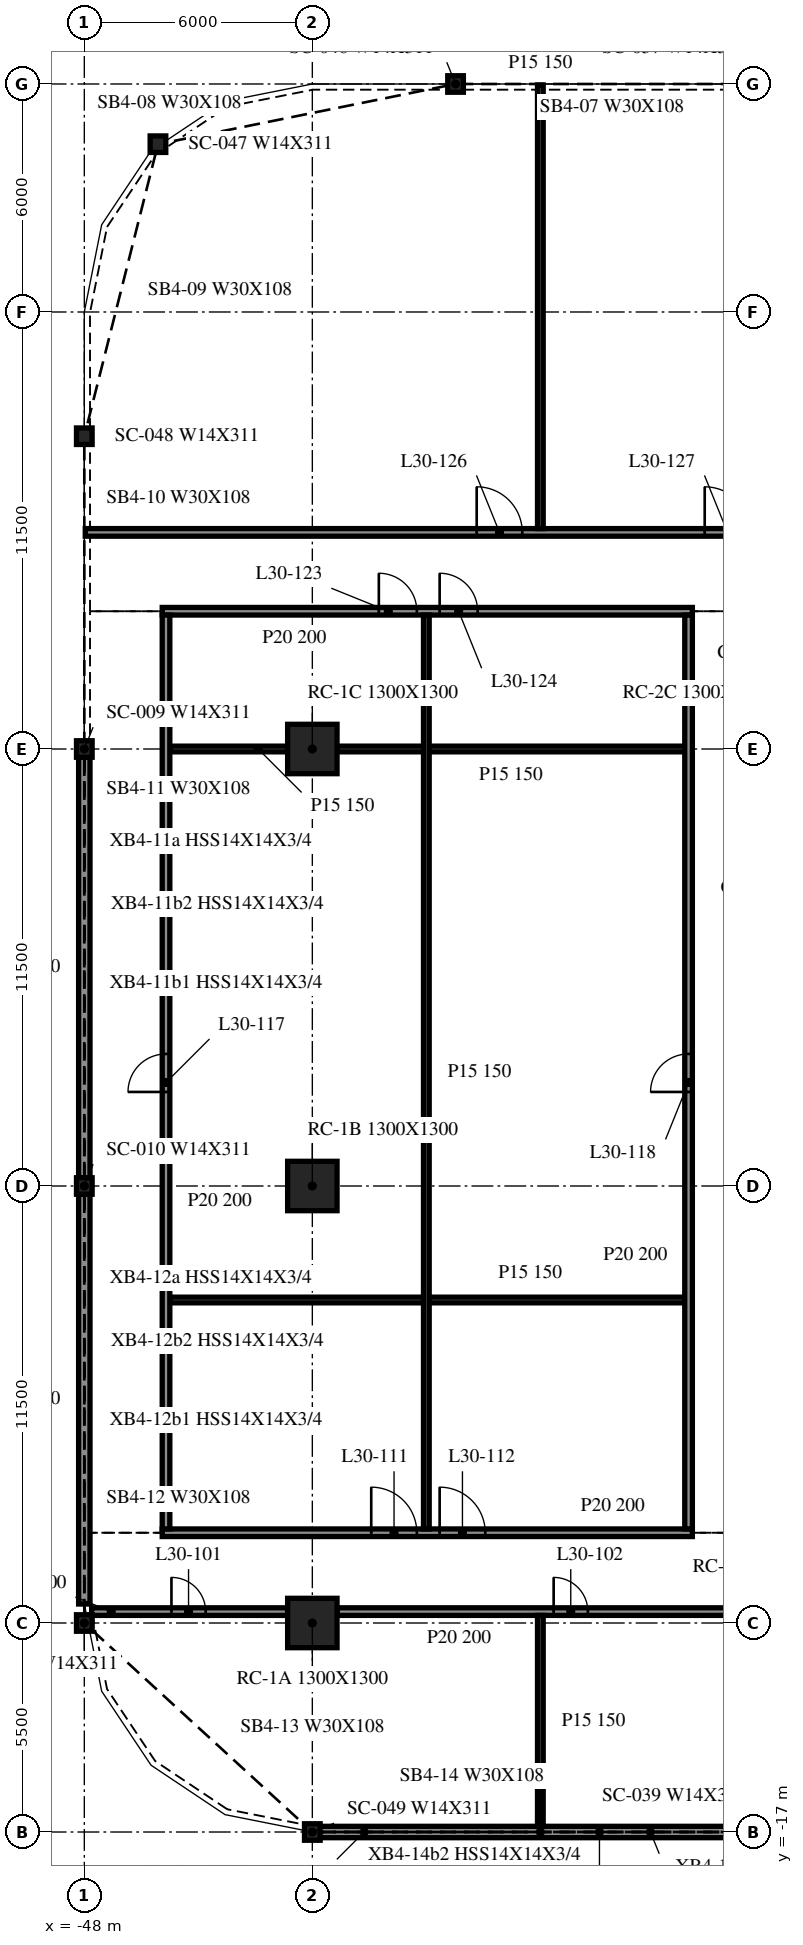
"""IFC4 building model, lengths in metres.
Left out: names, types, materials, properties, quantities, classifications, styles, units other than length and angle.
Written with IfcOpenShell. Run it as: python <this file> out.ifc"""

import sys

from ifc_helpers import new_model, si_unit, direction, frame, frame_2d, origin, origin_2d, place, context, subcontext, project, spatial, rectangle, i_section, extrude, element, fill, save


model = new_model("IFC4")
c1 = context("Model", 3, precision=1e-05, world=origin(), true_north=direction((0.0, 1.0)))
c2 = subcontext(c1, "Body", "Model", "MODEL_VIEW")
j1 = project(units=[si_unit("LENGTHUNIT", "METRE"), si_unit("PLANEANGLEUNIT", "RADIAN")], contexts=[c1])
p1 = place(None, origin())
s1 = spatial("IfcSite", under=j1, at=p1, CompositionType="ELEMENT")
p2 = place(p1, origin())
s2 = spatial("IfcBuilding", under=s1, at=p2, CompositionType="ELEMENT")
p3 = place(p2, frame((0.0, 0.0, 130.2)))
s3 = spatial("IfcBuildingStorey", under=s2, at=p3, CompositionType="ELEMENT", Elevation=130.2)
for number, where, z_axis, x_axis in (
    (1, (-42.0, -11.5, -0.34), (0.0, 0.0, 1.0), (1.0, 0.0, 0.0)),
    (2, (-42.0, 0.0, -0.34), (0.0, 0.0, 1.0), (1.0, 0.0, 0.0)),
    (3, (-42.0, 11.5, -0.34), (0.0, 0.0, 1.0), (1.0, 0.0, 0.0)),
):
    element("IfcColumn", number, at=place(p3, frame(where, z_axis=z_axis, x_axis=x_axis)), inside=s3, PredefinedType="COLUMN", context=c2, shape_type="SweptSolid", body=[
        extrude(rectangle(XDim=1.3, YDim=1.3, at=origin_2d()), origin(), (0.0, 0.0, 1.0), 4.1),
    ])
for number, where, z_axis, x_axis in (
    (4, (-38.231, 29.0, -0.34), (0.0, 0.0, 1.0), (1.0, 0.0, 0.0)),
    (5, (-46.062, 27.416, -0.34), (0.0, 0.0, 1.0), (1.0, 0.0, 0.0)),
    (6, (-48.0, 19.731, -0.34), (0.0, 0.0, 1.0), (1.0, 0.0, 0.0)),
    (7, (-48.0, 11.5, -0.34), (0.0, 0.0, 1.0), (1.0, 0.0, 0.0)),
    (8, (-48.0, 0.0, -0.34), (0.0, 0.0, 1.0), (1.0, 0.0, 0.0)),
    (9, (-48.0, -11.5, -0.34), (0.0, 0.0, 1.0), (1.0, 0.0, 0.0)),
    (10, (-42.0, -17.0, -0.34), (0.0, 0.0, 1.0), (1.0, 0.0, 0.0)),
):
    element("IfcColumn", number, at=place(p3, frame(where, z_axis=z_axis, x_axis=x_axis)), inside=s3, PredefinedType="COLUMN", context=c2, shape_type="SweptSolid", body=[
        extrude(i_section(OverallWidth=0.412, OverallDepth=0.434, WebThickness=0.036, FlangeThickness=0.057, at=origin_2d()), origin(), (0.0, 0.0, 1.0), 4.1),
    ])
p4 = place(p3, frame((-48.0, 11.282, 0.0), z_axis=(0.0, 0.0, 1.0), x_axis=(0.0, -1.0, 0.0)))
e11 = element("IfcWall", 11, at=p4, inside=s3, PredefinedType="NOTDEFINED", context=c2, shape_type="SweptSolid", body=[
    extrude(rectangle(XDim=11.064, YDim=0.3, at=frame_2d((5.532, 0.0))), origin(), (0.0, 0.0, 1.0), 3.003),
])
p5 = place(p3, frame((-48.0, -0.218, 0.0), z_axis=(0.0, 0.0, 1.0), x_axis=(0.0, -1.0, 0.0)))
e12 = element("IfcWall", 12, at=p5, inside=s3, PredefinedType="NOTDEFINED", context=c2, shape_type="SweptSolid", body=[
    extrude(rectangle(XDim=10.782, YDim=0.3, at=frame_2d((5.391, 0.0))), origin(), (0.0, 0.0, 1.0), 3.003),
])
p6 = place(p3, frame((-41.982, -17.0, 0.0), z_axis=(0.0, 0.0, 1.0), x_axis=(1.0, 0.0, 0.0)))
e13 = element("IfcWall", 13, at=p6, inside=s3, PredefinedType="NOTDEFINED", context=c2, shape_type="SweptSolid", body=[
    extrude(rectangle(XDim=11.964, YDim=0.3, at=frame_2d((5.982, 0.0))), origin(), (0.0, 0.0, 1.0), 3.003),
])
p7 = place(p3, frame((-47.807, -11.2, 0.0), z_axis=(0.0, 0.0, 1.0), x_axis=(1.0, 0.0, 0.0)))
e14 = element("IfcWall", 14, at=p7, inside=s3, PredefinedType="PARTITIONING", context=c2, shape_type="SweptSolid", body=[
    extrude(rectangle(XDim=5.157, YDim=0.2, at=frame_2d((2.579, 0.0))), origin(), (0.0, 0.0, 1.0), 3.76),
])
p8 = place(p7, frame((2.1, 0.0, 0.0)))
e15 = element("IfcOpeningElement", 15, at=p8, cuts=e14, PredefinedType="OPENING", context=c2, shape_type="SweptSolid", body=[
    extrude(rectangle(XDim=0.9, YDim=2.1, at=frame_2d((0.45, 1.05))), frame((0.0, 0.11, 0.0), z_axis=(0.0, -1.0, 0.0), x_axis=(1.0, 0.0, 0.0)), (0.0, 0.0, 1.0), 0.22),
])
p9 = place(p3, frame((-41.35, -11.2, 0.0), z_axis=(0.0, 0.0, 1.0), x_axis=(1.0, 0.0, 0.0)))
e16 = element("IfcWall", 16, at=p9, inside=s3, PredefinedType="PARTITIONING", context=c2, shape_type="SweptSolid", body=[
    extrude(rectangle(XDim=10.7, YDim=0.2, at=frame_2d((5.35, 0.0))), origin(), (0.0, 0.0, 1.0), 3.76),
])
p10 = place(p9, frame((5.7, 0.0, 0.0)))
e17 = element("IfcOpeningElement", 17, at=p10, cuts=e16, PredefinedType="OPENING", context=c2, shape_type="SweptSolid", body=[
    extrude(rectangle(XDim=0.9, YDim=2.1, at=frame_2d((0.45, 1.05))), frame((0.0, 0.11, 0.0), z_axis=(0.0, -1.0, 0.0), x_axis=(1.0, 0.0, 0.0)), (0.0, 0.0, 1.0), 0.22),
])
p11 = place(p3, frame((-45.95, -9.125, 0.0), z_axis=(0.0, 0.0, 1.0), x_axis=(1.0, 0.0, 0.0)))
e18 = element("IfcWall", 18, at=p11, inside=s3, PredefinedType="PARTITIONING", context=c2, shape_type="SweptSolid", body=[
    extrude(rectangle(XDim=13.95, YDim=0.2, at=frame_2d((6.975, 0.0))), origin(), (0.0, 0.0, 1.0), 3.76),
])
p12 = place(p11, frame((5.5, 0.0, 0.0)))
e19 = element("IfcOpeningElement", 19, at=p12, cuts=e18, PredefinedType="OPENING", context=c2, shape_type="SweptSolid", body=[
    extrude(rectangle(XDim=1.2, YDim=2.1, at=frame_2d((0.6, 1.05))), frame((0.0, 0.11, 0.0), z_axis=(0.0, -1.0, 0.0), x_axis=(1.0, 0.0, 0.0)), (0.0, 0.0, 1.0), 0.22),
])
p13 = place(p11, frame((7.3, 0.0, 0.0)))
e20 = element("IfcOpeningElement", 20, at=p13, cuts=e18, PredefinedType="OPENING", context=c2, shape_type="SweptSolid", body=[
    extrude(rectangle(XDim=1.2, YDim=2.1, at=frame_2d((0.6, 1.05))), frame((0.0, 0.11, 0.0), z_axis=(0.0, -1.0, 0.0), x_axis=(1.0, 0.0, 0.0)), (0.0, 0.0, 1.0), 0.22),
])
p14 = place(p3, frame((-45.75, -3.0, 0.0), z_axis=(0.0, 0.0, 1.0), x_axis=(1.0, 0.0, 0.0)))
e21 = element("IfcWall", 21, at=p14, inside=s3, PredefinedType="PARTITIONING", context=c2, shape_type="SweptSolid", body=[
    extrude(rectangle(XDim=13.55, YDim=0.15, at=frame_2d((6.775, 0.0))), origin(), (0.0, 0.0, 1.0), 3.76),
])
p15 = place(p3, frame((-45.75, 11.5, 0.0), z_axis=(0.0, 0.0, 1.0), x_axis=(1.0, 0.0, 0.0)))
e22 = element("IfcWall", 22, at=p15, inside=s3, PredefinedType="PARTITIONING", context=c2, shape_type="SweptSolid", body=[
    extrude(rectangle(XDim=3.1, YDim=0.15, at=frame_2d((1.55, 0.0))), origin(), (0.0, 0.0, 1.0), 3.76),
])
p16 = place(p3, frame((-41.35, 11.5, 0.0), z_axis=(0.0, 0.0, 1.0), x_axis=(1.0, 0.0, 0.0)))
e23 = element("IfcWall", 23, at=p16, inside=s3, PredefinedType="PARTITIONING", context=c2, shape_type="SweptSolid", body=[
    extrude(rectangle(XDim=9.15, YDim=0.15, at=frame_2d((4.575, 0.0))), origin(), (0.0, 0.0, 1.0), 3.76),
])
p17 = place(p3, frame((-45.95, 15.125, 0.0), z_axis=(0.0, 0.0, 1.0), x_axis=(1.0, 0.0, 0.0)))
e24 = element("IfcWall", 24, at=p17, inside=s3, PredefinedType="PARTITIONING", context=c2, shape_type="SweptSolid", body=[
    extrude(rectangle(XDim=13.95, YDim=0.2, at=frame_2d((6.975, 0.0))), origin(), (0.0, 0.0, 1.0), 3.76),
])
p18 = place(p17, frame((5.7, 0.0, 0.0)))
e25 = element("IfcOpeningElement", 25, at=p18, cuts=e24, PredefinedType="OPENING", context=c2, shape_type="SweptSolid", body=[
    extrude(rectangle(XDim=1.0, YDim=2.1, at=frame_2d((0.5, 1.05))), frame((0.0, 0.11, 0.0), z_axis=(0.0, -1.0, 0.0), x_axis=(1.0, 0.0, 0.0)), (0.0, 0.0, 1.0), 0.22),
])
p19 = place(p17, frame((7.3, 0.0, 0.0)))
e26 = element("IfcOpeningElement", 26, at=p19, cuts=e24, PredefinedType="OPENING", context=c2, shape_type="SweptSolid", body=[
    extrude(rectangle(XDim=1.0, YDim=2.1, at=frame_2d((0.5, 1.05))), frame((0.0, 0.11, 0.0), z_axis=(0.0, -1.0, 0.0), x_axis=(1.0, 0.0, 0.0)), (0.0, 0.0, 1.0), 0.22),
])
p20 = place(p3, frame((-47.975, 17.2, 0.0), z_axis=(0.0, 0.0, 1.0), x_axis=(1.0, 0.0, 0.0)))
e27 = element("IfcWall", 27, at=p20, inside=s3, PredefinedType="PARTITIONING", context=c2, shape_type="SweptSolid", body=[
    extrude(rectangle(XDim=95.95, YDim=0.2, at=frame_2d((47.975, 0.0))), origin(), (0.0, 0.0, 1.0), 3.76),
])
p21 = place(p20, frame((10.3, 0.0, 0.0)))
e28 = element("IfcOpeningElement", 28, at=p21, cuts=e27, PredefinedType="OPENING", context=c2, shape_type="SweptSolid", body=[
    extrude(rectangle(XDim=1.2, YDim=2.1, at=frame_2d((0.6, 1.05))), frame((0.0, 0.11, 0.0), z_axis=(0.0, -1.0, 0.0), x_axis=(1.0, 0.0, 0.0)), (0.0, 0.0, 1.0), 0.22),
])
p22 = place(p20, frame((16.3, 0.0, 0.0)))
e29 = element("IfcOpeningElement", 29, at=p22, cuts=e27, PredefinedType="OPENING", context=c2, shape_type="SweptSolid", body=[
    extrude(rectangle(XDim=1.2, YDim=2.1, at=frame_2d((0.6, 1.05))), frame((0.0, 0.11, 0.0), z_axis=(0.0, -1.0, 0.0), x_axis=(1.0, 0.0, 0.0)), (0.0, 0.0, 1.0), 0.22),
])
p23 = place(p20, frame((22.3, 0.0, 0.0)))
e30 = element("IfcOpeningElement", 30, at=p23, cuts=e27, PredefinedType="OPENING", context=c2, shape_type="SweptSolid", body=[
    extrude(rectangle(XDim=1.2, YDim=2.1, at=frame_2d((0.6, 1.05))), frame((0.0, 0.11, 0.0), z_axis=(0.0, -1.0, 0.0), x_axis=(1.0, 0.0, 0.0)), (0.0, 0.0, 1.0), 0.22),
])
p24 = place(p20, frame((25.5, 0.0, 0.0)))
e31 = element("IfcOpeningElement", 31, at=p24, cuts=e27, PredefinedType="OPENING", context=c2, shape_type="SweptSolid", body=[
    extrude(rectangle(XDim=1.0, YDim=2.1, at=frame_2d((0.5, 1.05))), frame((0.0, 0.11, 0.0), z_axis=(0.0, -1.0, 0.0), x_axis=(1.0, 0.0, 0.0)), (0.0, 0.0, 1.0), 0.22),
])
p25 = place(p20, frame((28.3, 0.0, 0.0)))
e32 = element("IfcOpeningElement", 32, at=p25, cuts=e27, PredefinedType="OPENING", context=c2, shape_type="SweptSolid", body=[
    extrude(rectangle(XDim=1.2, YDim=2.1, at=frame_2d((0.6, 1.05))), frame((0.0, 0.11, 0.0), z_axis=(0.0, -1.0, 0.0), x_axis=(1.0, 0.0, 0.0)), (0.0, 0.0, 1.0), 0.22),
])
p26 = place(p20, frame((34.5, 0.0, 0.0)))
e33 = element("IfcOpeningElement", 33, at=p26, cuts=e27, PredefinedType="OPENING", context=c2, shape_type="SweptSolid", body=[
    extrude(rectangle(XDim=1.0, YDim=2.1, at=frame_2d((0.5, 1.05))), frame((0.0, 0.11, 0.0), z_axis=(0.0, -1.0, 0.0), x_axis=(1.0, 0.0, 0.0)), (0.0, 0.0, 1.0), 0.22),
])
p27 = place(p20, frame((46.3, 0.0, 0.0)))
e34 = element("IfcOpeningElement", 34, at=p27, cuts=e27, PredefinedType="OPENING", context=c2, shape_type="SweptSolid", body=[
    extrude(rectangle(XDim=1.2, YDim=2.1, at=frame_2d((0.6, 1.05))), frame((0.0, 0.11, 0.0), z_axis=(0.0, -1.0, 0.0), x_axis=(1.0, 0.0, 0.0)), (0.0, 0.0, 1.0), 0.22),
])
p28 = place(p20, frame((48.1, 0.0, 0.0)))
e35 = element("IfcOpeningElement", 35, at=p28, cuts=e27, PredefinedType="OPENING", context=c2, shape_type="SweptSolid", body=[
    extrude(rectangle(XDim=1.2, YDim=2.1, at=frame_2d((0.6, 1.05))), frame((0.0, 0.11, 0.0), z_axis=(0.0, -1.0, 0.0), x_axis=(1.0, 0.0, 0.0)), (0.0, 0.0, 1.0), 0.22),
])
p29 = place(p20, frame((54.1, 0.0, 0.0)))
e36 = element("IfcOpeningElement", 36, at=p29, cuts=e27, PredefinedType="OPENING", context=c2, shape_type="SweptSolid", body=[
    extrude(rectangle(XDim=1.2, YDim=2.1, at=frame_2d((0.6, 1.05))), frame((0.0, 0.11, 0.0), z_axis=(0.0, -1.0, 0.0), x_axis=(1.0, 0.0, 0.0)), (0.0, 0.0, 1.0), 0.22),
])
p30 = place(p20, frame((60.1, 0.0, 0.0)))
e37 = element("IfcOpeningElement", 37, at=p30, cuts=e27, PredefinedType="OPENING", context=c2, shape_type="SweptSolid", body=[
    extrude(rectangle(XDim=1.0, YDim=2.1, at=frame_2d((0.5, 1.05))), frame((0.0, 0.11, 0.0), z_axis=(0.0, -1.0, 0.0), x_axis=(1.0, 0.0, 0.0)), (0.0, 0.0, 1.0), 0.22),
])
p31 = place(p20, frame((63.1, 0.0, 0.0)))
e38 = element("IfcOpeningElement", 38, at=p31, cuts=e27, PredefinedType="OPENING", context=c2, shape_type="SweptSolid", body=[
    extrude(rectangle(XDim=1.2, YDim=2.1, at=frame_2d((0.6, 1.05))), frame((0.0, 0.11, 0.0), z_axis=(0.0, -1.0, 0.0), x_axis=(1.0, 0.0, 0.0)), (0.0, 0.0, 1.0), 0.22),
])
p32 = place(p20, frame((66.1, 0.0, 0.0)))
e39 = element("IfcOpeningElement", 39, at=p32, cuts=e27, PredefinedType="OPENING", context=c2, shape_type="SweptSolid", body=[
    extrude(rectangle(XDim=1.0, YDim=2.1, at=frame_2d((0.5, 1.05))), frame((0.0, 0.11, 0.0), z_axis=(0.0, -1.0, 0.0), x_axis=(1.0, 0.0, 0.0)), (0.0, 0.0, 1.0), 0.22),
])
p33 = place(p20, frame((72.1, 0.0, 0.0)))
e40 = element("IfcOpeningElement", 40, at=p33, cuts=e27, PredefinedType="OPENING", context=c2, shape_type="SweptSolid", body=[
    extrude(rectangle(XDim=1.2, YDim=2.1, at=frame_2d((0.6, 1.05))), frame((0.0, 0.11, 0.0), z_axis=(0.0, -1.0, 0.0), x_axis=(1.0, 0.0, 0.0)), (0.0, 0.0, 1.0), 0.22),
])
p34 = place(p20, frame((84.1, 0.0, 0.0)))
e41 = element("IfcOpeningElement", 41, at=p34, cuts=e27, PredefinedType="OPENING", context=c2, shape_type="SweptSolid", body=[
    extrude(rectangle(XDim=1.2, YDim=2.1, at=frame_2d((0.6, 1.05))), frame((0.0, 0.11, 0.0), z_axis=(0.0, -1.0, 0.0), x_axis=(1.0, 0.0, 0.0)), (0.0, 0.0, 1.0), 0.22),
])
p35 = place(p20, frame((90.1, 0.0, 0.0)))
e42 = element("IfcOpeningElement", 42, at=p35, cuts=e27, PredefinedType="OPENING", context=c2, shape_type="SweptSolid", body=[
    extrude(rectangle(XDim=1.2, YDim=2.1, at=frame_2d((0.6, 1.05))), frame((0.0, 0.11, 0.0), z_axis=(0.0, -1.0, 0.0), x_axis=(1.0, 0.0, 0.0)), (0.0, 0.0, 1.0), 0.22),
])
p36 = place(p3, frame((-45.85, -9.025, 0.0), z_axis=(0.0, 0.0, 1.0), x_axis=(0.0, 1.0, 0.0)))
e43 = element("IfcWall", 43, at=p36, inside=s3, PredefinedType="PARTITIONING", context=c2, shape_type="SweptSolid", body=[
    extrude(rectangle(XDim=24.05, YDim=0.2, at=frame_2d((12.025, 0.0))), origin(), (0.0, 0.0, 1.0), 3.76),
])
p37 = place(p36, frame((11.5, 0.0, 0.0)))
e44 = element("IfcOpeningElement", 44, at=p37, cuts=e43, PredefinedType="OPENING", context=c2, shape_type="SweptSolid", body=[
    extrude(rectangle(XDim=1.0, YDim=2.1, at=frame_2d((0.5, 1.05))), frame((0.0, 0.11, 0.0), z_axis=(0.0, -1.0, 0.0), x_axis=(1.0, 0.0, 0.0)), (0.0, 0.0, 1.0), 0.22),
])
p38 = place(p3, frame((-39.0, -9.025, 0.0), z_axis=(0.0, 0.0, 1.0), x_axis=(0.0, 1.0, 0.0)))
e45 = element("IfcWall", 45, at=p38, inside=s3, PredefinedType="PARTITIONING", context=c2, shape_type="SweptSolid", body=[
    extrude(rectangle(XDim=24.05, YDim=0.15, at=frame_2d((12.025, 0.0))), origin(), (0.0, 0.0, 1.0), 3.76),
])
p39 = place(p3, frame((-36.0, -16.85, 0.0), z_axis=(0.0, 0.0, 1.0), x_axis=(0.0, 1.0, 0.0)))
e46 = element("IfcWall", 46, at=p39, inside=s3, PredefinedType="PARTITIONING", context=c2, shape_type="SweptSolid", body=[
    extrude(rectangle(XDim=5.55, YDim=0.15, at=frame_2d((2.775, 0.0))), origin(), (0.0, 0.0, 1.0), 3.76),
])
p40 = place(p3, frame((-36.0, 17.3, 0.0), z_axis=(0.0, 0.0, 1.0), x_axis=(0.0, 1.0, 0.0)))
e47 = element("IfcWall", 47, at=p40, inside=s3, PredefinedType="PARTITIONING", context=c2, shape_type="SweptSolid", body=[
    extrude(rectangle(XDim=11.675, YDim=0.15, at=frame_2d((5.837, 0.0))), origin(), (0.0, 0.0, 1.0), 3.76),
])
p41 = place(p3, frame((-32.1, -9.025, 0.0), z_axis=(0.0, 0.0, 1.0), x_axis=(0.0, 1.0, 0.0)))
e48 = element("IfcWall", 48, at=p41, inside=s3, PredefinedType="PARTITIONING", context=c2, shape_type="SweptSolid", body=[
    extrude(rectangle(XDim=24.05, YDim=0.2, at=frame_2d((12.025, 0.0))), origin(), (0.0, 0.0, 1.0), 3.76),
])
p42 = place(p41, frame((11.5, 0.0, 0.0)))
e49 = element("IfcOpeningElement", 49, at=p42, cuts=e48, PredefinedType="OPENING", context=c2, shape_type="SweptSolid", body=[
    extrude(rectangle(XDim=1.0, YDim=2.1, at=frame_2d((0.5, 1.05))), frame((0.0, 0.11, 0.0), z_axis=(0.0, -1.0, 0.0), x_axis=(1.0, 0.0, 0.0)), (0.0, 0.0, 1.0), 0.22),
])
p43 = place(p8, origin())
e50 = element("IfcDoor", 50, at=p43, inside=s3, OperationType="SINGLE_SWING_RIGHT", PredefinedType="DOOR", context=c2, shape_type="SweptSolid", body=[
    extrude(rectangle(XDim=0.9, YDim=2.1, at=frame_2d((0.45, 1.05))), frame((0.0, 0.025, 0.0), z_axis=(0.0, -1.0, 0.0), x_axis=(1.0, 0.0, 0.0)), (0.0, 0.0, 1.0), 0.05),
])
fill(e15, e50)
p44 = place(p10, origin())
e51 = element("IfcDoor", 51, at=p44, inside=s3, OperationType="SINGLE_SWING_LEFT", PredefinedType="DOOR", context=c2, shape_type="SweptSolid", body=[
    extrude(rectangle(XDim=0.9, YDim=2.1, at=frame_2d((0.45, 1.05))), frame((0.0, 0.025, 0.0), z_axis=(0.0, -1.0, 0.0), x_axis=(1.0, 0.0, 0.0)), (0.0, 0.0, 1.0), 0.05),
])
fill(e17, e51)
p45 = place(p12, origin())
e52 = element("IfcDoor", 52, at=p45, inside=s3, OperationType="SINGLE_SWING_LEFT", PredefinedType="DOOR", context=c2, shape_type="SweptSolid", body=[
    extrude(rectangle(XDim=1.2, YDim=2.1, at=frame_2d((0.6, 1.05))), frame((0.0, 0.025, 0.0), z_axis=(0.0, -1.0, 0.0), x_axis=(1.0, 0.0, 0.0)), (0.0, 0.0, 1.0), 0.05),
])
fill(e19, e52)
p46 = place(p13, origin())
e53 = element("IfcDoor", 53, at=p46, inside=s3, OperationType="SINGLE_SWING_RIGHT", PredefinedType="DOOR", context=c2, shape_type="SweptSolid", body=[
    extrude(rectangle(XDim=1.2, YDim=2.1, at=frame_2d((0.6, 1.05))), frame((0.0, 0.025, 0.0), z_axis=(0.0, -1.0, 0.0), x_axis=(1.0, 0.0, 0.0)), (0.0, 0.0, 1.0), 0.05),
])
fill(e20, e53)
p47 = place(p37, origin())
e54 = element("IfcDoor", 54, at=p47, inside=s3, OperationType="SINGLE_SWING_RIGHT", PredefinedType="DOOR", context=c2, shape_type="SweptSolid", body=[
    extrude(rectangle(XDim=1.0, YDim=2.1, at=frame_2d((0.5, 1.05))), frame((0.0, 0.025, 0.0), z_axis=(0.0, -1.0, 0.0), x_axis=(1.0, 0.0, 0.0)), (0.0, 0.0, 1.0), 0.05),
])
fill(e44, e54)
p48 = place(p42, origin())
e55 = element("IfcDoor", 55, at=p48, inside=s3, OperationType="SINGLE_SWING_LEFT", PredefinedType="DOOR", context=c2, shape_type="SweptSolid", body=[
    extrude(rectangle(XDim=1.0, YDim=2.1, at=frame_2d((0.5, 1.05))), frame((0.0, 0.025, 0.0), z_axis=(0.0, -1.0, 0.0), x_axis=(1.0, 0.0, 0.0)), (0.0, 0.0, 1.0), 0.05),
])
fill(e49, e55)
p49 = place(p18, origin())
e56 = element("IfcDoor", 56, at=p49, inside=s3, OperationType="SINGLE_SWING_RIGHT", PredefinedType="DOOR", context=c2, shape_type="SweptSolid", body=[
    extrude(rectangle(XDim=1.0, YDim=2.1, at=frame_2d((0.5, 1.05))), frame((0.0, 0.025, 0.0), z_axis=(0.0, -1.0, 0.0), x_axis=(1.0, 0.0, 0.0)), (0.0, 0.0, 1.0), 0.05),
])
fill(e25, e56)
p50 = place(p19, origin())
e57 = element("IfcDoor", 57, at=p50, inside=s3, OperationType="SINGLE_SWING_LEFT", PredefinedType="DOOR", context=c2, shape_type="SweptSolid", body=[
    extrude(rectangle(XDim=1.0, YDim=2.1, at=frame_2d((0.5, 1.05))), frame((0.0, 0.025, 0.0), z_axis=(0.0, -1.0, 0.0), x_axis=(1.0, 0.0, 0.0)), (0.0, 0.0, 1.0), 0.05),
])
fill(e26, e57)
p51 = place(p21, origin())
e58 = element("IfcDoor", 58, at=p51, inside=s3, OperationType="SINGLE_SWING_LEFT", PredefinedType="DOOR", context=c2, shape_type="SweptSolid", body=[
    extrude(rectangle(XDim=1.2, YDim=2.1, at=frame_2d((0.6, 1.05))), frame((0.0, 0.025, 0.0), z_axis=(0.0, -1.0, 0.0), x_axis=(1.0, 0.0, 0.0)), (0.0, 0.0, 1.0), 0.05),
])
fill(e28, e58)
p52 = place(p22, origin())
e59 = element("IfcDoor", 59, at=p52, inside=s3, OperationType="SINGLE_SWING_LEFT", PredefinedType="DOOR", context=c2, shape_type="SweptSolid", body=[
    extrude(rectangle(XDim=1.2, YDim=2.1, at=frame_2d((0.6, 1.05))), frame((0.0, 0.025, 0.0), z_axis=(0.0, -1.0, 0.0), x_axis=(1.0, 0.0, 0.0)), (0.0, 0.0, 1.0), 0.05),
])
fill(e29, e59)
save(model, sys.argv[1])
